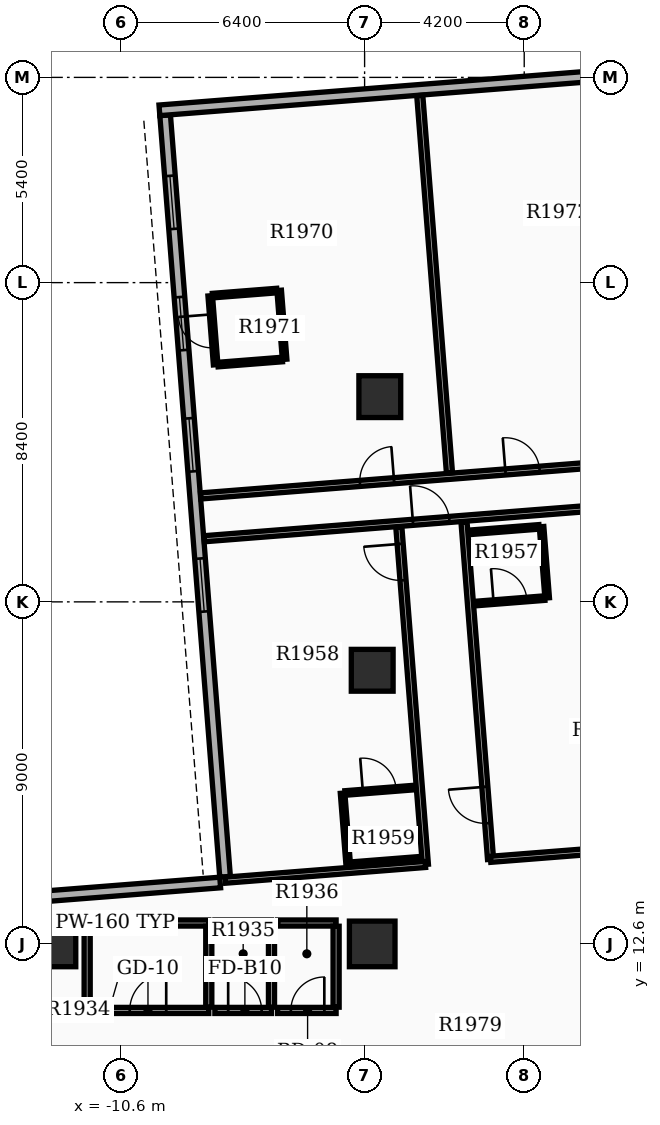
"""IFC4 building model, lengths in metres.
Left out: names, types, materials, properties, quantities, classifications, styles, units other than length and angle.
Written with IfcOpenShell. Run it as: python <this file> out.ifc"""

import sys

from ifc_helpers import new_model, si_unit, direction, frame, frame_2d, origin, origin_2d, place, context, subcontext, project, spatial, rectangle, extrude, element, fill, save


model = new_model("IFC4")
c1 = context("Model", 3, precision=1e-05, world=origin(), true_north=direction((0.0, 1.0)))
c2 = subcontext(c1, "Body", "Model", "MODEL_VIEW")
j1 = project(units=[si_unit("LENGTHUNIT", "METRE"), si_unit("PLANEANGLEUNIT", "RADIAN")], contexts=[c1])
p1 = place(None, origin())
s1 = spatial("IfcSite", under=j1, at=p1, CompositionType="ELEMENT")
p2 = place(p1, origin())
s2 = spatial("IfcBuilding", under=s1, at=p2, CompositionType="ELEMENT")
p3 = place(p2, frame((0.0, 0.0, 124.2)))
s3 = spatial("IfcBuildingStorey", under=s2, at=p3, CompositionType="ELEMENT", Elevation=124.2)
for number, where, z_axis, x_axis in (
    (1, (-12.4, 12.6, 0.0), (0.0, 0.0, 1.0), (1.0, 0.0, 0.0)),
    (2, (-4.0, 12.6, 0.0), (0.0, 0.0, 1.0), (1.0, 0.0, 0.0)),
):
    element("IfcColumn", number, at=place(p3, frame(where, z_axis=z_axis, x_axis=x_axis)), inside=s3, PredefinedType="COLUMN", context=c2, shape_type="SweptSolid", body=[
        extrude(rectangle(XDim=1.2, YDim=1.2, at=origin_2d()), origin(), (0.0, 0.0, 1.0), 3.9),
    ])
for number, where, z_axis, x_axis in (
    (3, (-4.0, 19.8, 0.0), (0.0, 0.0, 1.0), (1.0, 0.0, 0.0)),
    (4, (-3.8, 27.0, 0.0), (0.0, 0.0, 1.0), (1.0, 0.0, 0.0)),
):
    element("IfcColumn", number, at=place(p3, frame(where, z_axis=z_axis, x_axis=x_axis)), inside=s3, PredefinedType="COLUMN", context=c2, shape_type="SweptSolid", body=[
        extrude(rectangle(XDim=1.1, YDim=1.1, at=origin_2d()), origin(), (0.0, 0.0, 1.0), 3.9),
    ])
p4 = place(p3, frame((-9.448, 34.405, 0.0), z_axis=(0.0, 0.0, 1.0), x_axis=(0.078452802979, -0.996917828963, 0.0)))
e5 = element("IfcWall", 5, at=p4, inside=s3, PredefinedType="STANDARD", context=c2, shape_type="SweptSolid", body=[
    extrude(rectangle(XDim=20.1, YDim=0.28, at=frame_2d((10.05, 0.0))), origin(), (0.0, 0.0, 1.0), 2.97),
])
p5 = place(p4, frame((1.6, 0.0, 0.8)))
e6 = element("IfcOpeningElement", 6, at=p5, cuts=e5, PredefinedType="OPENING", context=c2, shape_type="SweptSolid", body=[
    extrude(rectangle(XDim=1.4, YDim=1.6, at=frame_2d((0.7, 0.8))), frame((0.0, 0.15, 0.0), z_axis=(0.0, -1.0, 0.0), x_axis=(1.0, 0.0, 0.0)), (0.0, 0.0, 1.0), 0.3),
])
p6 = place(p4, frame((4.8, 0.0, 0.8)))
e7 = element("IfcOpeningElement", 7, at=p6, cuts=e5, PredefinedType="OPENING", context=c2, shape_type="SweptSolid", body=[
    extrude(rectangle(XDim=1.4, YDim=1.6, at=frame_2d((0.7, 0.8))), frame((0.0, 0.15, 0.0), z_axis=(0.0, -1.0, 0.0), x_axis=(1.0, 0.0, 0.0)), (0.0, 0.0, 1.0), 0.3),
])
p7 = place(p4, frame((8.0, 0.0, 0.8)))
e8 = element("IfcOpeningElement", 8, at=p7, cuts=e5, PredefinedType="OPENING", context=c2, shape_type="SweptSolid", body=[
    extrude(rectangle(XDim=1.4, YDim=1.6, at=frame_2d((0.7, 0.8))), frame((0.0, 0.15, 0.0), z_axis=(0.0, -1.0, 0.0), x_axis=(1.0, 0.0, 0.0)), (0.0, 0.0, 1.0), 0.3),
])
p8 = place(p4, frame((11.7, 0.0, 0.8)))
e9 = element("IfcOpeningElement", 9, at=p8, cuts=e5, PredefinedType="OPENING", context=c2, shape_type="SweptSolid", body=[
    extrude(rectangle(XDim=1.4, YDim=1.6, at=frame_2d((0.7, 0.8))), frame((0.0, 0.15, 0.0), z_axis=(0.0, -1.0, 0.0), x_axis=(1.0, 0.0, 0.0)), (0.0, 0.0, 1.0), 0.3),
])
p9 = place(p3, frame((4.079, 35.61, 0.0), z_axis=(0.0, 0.0, 1.0), x_axis=(-0.996916198482, -0.078473519122, 0.0)))
e10 = element("IfcWall", 10, at=p9, inside=s3, PredefinedType="STANDARD", context=c2, shape_type="SweptSolid", body=[
    extrude(rectangle(XDim=13.72, YDim=0.28, at=frame_2d((6.86, 0.0))), origin(), (0.0, 0.0, 1.0), 2.97),
])
p10 = place(p9, frame((0.85, 0.0, 0.85)))
e11 = element("IfcOpeningElement", 11, at=p10, cuts=e10, PredefinedType="OPENING", context=c2, shape_type="SweptSolid", body=[
    extrude(rectangle(XDim=1.0, YDim=1.5, at=frame_2d((0.5, 0.75))), frame((0.0, 0.15, 0.0), z_axis=(0.0, -1.0, 0.0), x_axis=(1.0, 0.0, 0.0)), (0.0, 0.0, 1.0), 0.3),
])
p11 = place(p3, frame((-14.281, 13.722, 0.0), z_axis=(0.0, 0.0, 1.0), x_axis=(0.99691915642, 0.078435932851, 0.0)))
e12 = element("IfcWall", 12, at=p11, inside=s3, PredefinedType="STANDARD", context=c2, shape_type="SweptSolid", body=[
    extrude(rectangle(XDim=6.3, YDim=0.28, at=frame_2d((3.15, 0.0))), origin(), (0.0, 0.0, 1.0), 2.97),
])
p12 = place(p3, frame((-11.5, 10.85, 0.0), z_axis=(0.0, 0.0, 1.0), x_axis=(1.0, 0.0, 0.0)))
e13 = element("IfcWall", 13, at=p12, inside=s3, PredefinedType="PARTITIONING", context=c2, shape_type="SweptSolid", body=[
    extrude(rectangle(XDim=3.2, YDim=0.16, at=frame_2d((1.6, 0.0))), origin(), (0.0, 0.0, 1.0), 2.96),
])
p13 = place(p12, frame((1.12, 0.0, 0.0)))
e14 = element("IfcOpeningElement", 14, at=p13, cuts=e13, PredefinedType="OPENING", context=c2, shape_type="SweptSolid", body=[
    extrude(rectangle(XDim=0.96, YDim=2.15, at=frame_2d((0.48, 1.075))), frame((0.0, 0.09, 0.0), z_axis=(0.0, -1.0, 0.0), x_axis=(1.0, 0.0, 0.0)), (0.0, 0.0, 1.0), 0.18),
])
p14 = place(p3, frame((-11.5, 13.15, 0.0), z_axis=(0.0, 0.0, 1.0), x_axis=(1.0, 0.0, 0.0)))
e15 = element("IfcWall", 15, at=p14, inside=s3, PredefinedType="PARTITIONING", context=c2, shape_type="SweptSolid", body=[
    extrude(rectangle(XDim=3.2, YDim=0.16, at=frame_2d((1.6, 0.0))), origin(), (0.0, 0.0, 1.0), 2.96),
])
for number, where, z_axis, x_axis in (
    (16, (-11.5, 10.935, 0.0), (0.0, 0.0, 1.0), (0.0, 1.0, 0.0)),
    (17, (-8.3, 10.935, 0.0), (0.0, 0.0, 1.0), (0.0, 1.0, 0.0)),
):
    element("IfcWall", number, at=place(p3, frame(where, z_axis=z_axis, x_axis=x_axis)), inside=s3, PredefinedType="PARTITIONING", context=c2, shape_type="SweptSolid", body=[
        extrude(rectangle(XDim=2.13, YDim=0.16, at=frame_2d((1.065, 0.0))), origin(), (0.0, 0.0, 1.0), 2.96),
    ])
p15 = place(p3, frame((-8.14, 10.85, 0.0), z_axis=(0.0, 0.0, 1.0), x_axis=(1.0, 0.0, 0.0)))
e18 = element("IfcWall", 18, at=p15, inside=s3, PredefinedType="PARTITIONING", context=c2, shape_type="SweptSolid", body=[
    extrude(rectangle(XDim=1.49, YDim=0.16, at=frame_2d((0.745, 0.0))), origin(), (0.0, 0.0, 1.0), 2.96),
])
p16 = place(p15, frame((0.35, 0.0, 0.0)))
e19 = element("IfcOpeningElement", 19, at=p16, cuts=e18, PredefinedType="OPENING", context=c2, shape_type="SweptSolid", body=[
    extrude(rectangle(XDim=0.88, YDim=2.1, at=frame_2d((0.44, 1.05))), frame((0.0, 0.09, 0.0), z_axis=(0.0, -1.0, 0.0), x_axis=(1.0, 0.0, 0.0)), (0.0, 0.0, 1.0), 0.18),
])
p17 = place(p3, frame((-8.14, 13.15, 0.0), z_axis=(0.0, 0.0, 1.0), x_axis=(1.0, 0.0, 0.0)))
e20 = element("IfcWall", 20, at=p17, inside=s3, PredefinedType="PARTITIONING", context=c2, shape_type="SweptSolid", body=[
    extrude(rectangle(XDim=1.49, YDim=0.16, at=frame_2d((0.745, 0.0))), origin(), (0.0, 0.0, 1.0), 2.96),
])
p18 = place(p3, frame((-6.65, 10.935, 0.0), z_axis=(0.0, 0.0, 1.0), x_axis=(0.0, 1.0, 0.0)))
e21 = element("IfcWall", 21, at=p18, inside=s3, PredefinedType="PARTITIONING", context=c2, shape_type="SweptSolid", body=[
    extrude(rectangle(XDim=2.13, YDim=0.16, at=frame_2d((1.065, 0.0))), origin(), (0.0, 0.0, 1.0), 2.96),
])
p19 = place(p3, frame((-6.49, 10.85, 0.0), z_axis=(0.0, 0.0, 1.0), x_axis=(1.0, 0.0, 0.0)))
e22 = element("IfcWall", 22, at=p19, inside=s3, PredefinedType="PARTITIONING", context=c2, shape_type="SweptSolid", body=[
    extrude(rectangle(XDim=1.54, YDim=0.16, at=frame_2d((0.77, 0.0))), origin(), (0.0, 0.0, 1.0), 2.96),
])
p20 = place(p19, frame((0.35, 0.0, 0.0)))
e23 = element("IfcOpeningElement", 23, at=p20, cuts=e22, PredefinedType="OPENING", context=c2, shape_type="SweptSolid", body=[
    extrude(rectangle(XDim=0.88, YDim=2.15, at=frame_2d((0.44, 1.075))), frame((0.0, 0.09, 0.0), z_axis=(0.0, -1.0, 0.0), x_axis=(1.0, 0.0, 0.0)), (0.0, 0.0, 1.0), 0.18),
])
p21 = place(p3, frame((-6.49, 13.15, 0.0), z_axis=(0.0, 0.0, 1.0), x_axis=(1.0, 0.0, 0.0)))
e24 = element("IfcWall", 24, at=p21, inside=s3, PredefinedType="PARTITIONING", context=c2, shape_type="SweptSolid", body=[
    extrude(rectangle(XDim=1.54, YDim=0.16, at=frame_2d((0.77, 0.0))), origin(), (0.0, 0.0, 1.0), 2.96),
])
p22 = place(p3, frame((-4.95, 10.935, 0.0), z_axis=(0.0, 0.0, 1.0), x_axis=(0.0, 1.0, 0.0)))
e25 = element("IfcWall", 25, at=p22, inside=s3, PredefinedType="PARTITIONING", context=c2, shape_type="SweptSolid", body=[
    extrude(rectangle(XDim=2.13, YDim=0.16, at=frame_2d((1.065, 0.0))), origin(), (0.0, 0.0, 1.0), 2.96),
])
p23 = place(p3, frame((-0.886, 14.826, 0.0), z_axis=(0.0, 0.0, 1.0), x_axis=(-0.078454258523, 0.996917714418, 0.0)))
e26 = element("IfcWall", 26, at=p23, inside=s3, PredefinedType="PARTITIONING", context=c2, shape_type="SweptSolid", body=[
    extrude(rectangle(XDim=8.9, YDim=0.16, at=frame_2d((4.45, 0.0))), origin(), (0.0, 0.0, 1.0), 2.96),
])
p24 = place(p23, frame((0.953, 0.0, 0.0)))
e27 = element("IfcOpeningElement", 27, at=p24, cuts=e26, PredefinedType="OPENING", context=c2, shape_type="SweptSolid", body=[
    extrude(rectangle(XDim=0.96, YDim=2.15, at=frame_2d((0.48, 1.075))), frame((0.0, 0.09, 0.0), z_axis=(0.0, -1.0, 0.0), x_axis=(1.0, 0.0, 0.0)), (0.0, 0.0, 1.0), 0.18),
])
p25 = place(p3, frame((-0.886, 14.826, 0.0), z_axis=(0.0, 0.0, 1.0), x_axis=(0.996916203247, 0.078473458597, 0.0)))
e28 = element("IfcWall", 28, at=p25, inside=s3, PredefinedType="PARTITIONING", context=c2, shape_type="SweptSolid", body=[
    extrude(rectangle(XDim=6.44, YDim=0.16, at=frame_2d((3.22, 0.0))), origin(), (0.0, 0.0, 1.0), 2.96),
])
p26 = place(p3, frame((-1.275, 21.556, 0.0), z_axis=(0.0, 0.0, 1.0), x_axis=(0.996916400774, 0.0784709492, 0.0)))
e29 = element("IfcWall", 29, at=p26, inside=s3, PredefinedType="PARTITIONING", context=c2, shape_type="SweptSolid", body=[
    extrude(rectangle(XDim=1.82, YDim=0.12, at=frame_2d((0.91, 0.0))), origin(), (0.0, 0.0, 1.0), 2.96),
])
p27 = place(p26, frame((0.47, 0.0, 0.0)))
e30 = element("IfcOpeningElement", 30, at=p27, cuts=e29, PredefinedType="OPENING", context=c2, shape_type="SweptSolid", body=[
    extrude(rectangle(XDim=0.88, YDim=2.1, at=frame_2d((0.44, 1.05))), frame((0.0, 0.07, 0.0), z_axis=(0.0, -1.0, 0.0), x_axis=(1.0, 0.0, 0.0)), (0.0, 0.0, 1.0), 0.14),
])
p28 = place(p3, frame((-1.423, 23.431, 0.0), z_axis=(0.0, 0.0, 1.0), x_axis=(0.996915574626, 0.078481444107, 0.0)))
e31 = element("IfcWall", 31, at=p28, inside=s3, PredefinedType="PARTITIONING", context=c2, shape_type="SweptSolid", body=[
    extrude(rectangle(XDim=1.82, YDim=0.12, at=frame_2d((0.91, 0.0))), origin(), (0.0, 0.0, 1.0), 2.96),
])
p29 = place(p3, frame((0.604, 21.704, 0.0), z_axis=(0.0, 0.0, 1.0), x_axis=(-0.07843418698, 0.996919293781, 0.0)))
e32 = element("IfcWall", 32, at=p29, inside=s3, PredefinedType="PARTITIONING", context=c2, shape_type="SweptSolid", body=[
    extrude(rectangle(XDim=1.88, YDim=0.12, at=frame_2d((0.94, 0.0))), origin(), (0.0, 0.0, 1.0), 2.96),
])
p30 = place(p3, frame((-2.601, 14.691, 0.0), z_axis=(0.0, 0.0, 1.0), x_axis=(-0.07848152115, 0.99691556856, 0.0)))
e33 = element("IfcWall", 33, at=p30, inside=s3, PredefinedType="PARTITIONING", context=c2, shape_type="SweptSolid", body=[
    extrude(rectangle(XDim=8.9, YDim=0.16, at=frame_2d((4.45, 0.0))), origin(), (0.0, 0.0, 1.0), 2.96),
])
p31 = place(p30, frame((7.5, 0.0, 0.0)))
e34 = element("IfcOpeningElement", 34, at=p31, cuts=e33, PredefinedType="OPENING", context=c2, shape_type="SweptSolid", body=[
    extrude(rectangle(XDim=0.96, YDim=2.15, at=frame_2d((0.48, 1.075))), frame((0.0, 0.09, 0.0), z_axis=(0.0, -1.0, 0.0), x_axis=(1.0, 0.0, 0.0)), (0.0, 0.0, 1.0), 0.18),
])
p32 = place(p3, frame((-2.601, 14.691, 0.0), z_axis=(0.0, 0.0, 1.0), x_axis=(-0.996920542587, -0.078418312705, 0.0)))
e35 = element("IfcWall", 35, at=p32, inside=s3, PredefinedType="PARTITIONING", context=c2, shape_type="SweptSolid", body=[
    extrude(rectangle(XDim=5.28, YDim=0.16, at=frame_2d((2.64, 0.0))), origin(), (0.0, 0.0, 1.0), 2.96),
])
p33 = place(p3, frame((-4.715, 16.571, 0.0), z_axis=(0.0, 0.0, 1.0), x_axis=(0.996915574626, 0.078481444107, 0.0)))
e36 = element("IfcWall", 36, at=p33, inside=s3, PredefinedType="PARTITIONING", context=c2, shape_type="SweptSolid", body=[
    extrude(rectangle(XDim=1.82, YDim=0.12, at=frame_2d((0.91, 0.0))), origin(), (0.0, 0.0, 1.0), 2.96),
])
p34 = place(p33, frame((0.47, 0.0, 0.0)))
e37 = element("IfcOpeningElement", 37, at=p34, cuts=e36, PredefinedType="OPENING", context=c2, shape_type="SweptSolid", body=[
    extrude(rectangle(XDim=0.88, YDim=2.1, at=frame_2d((0.44, 1.05))), frame((0.0, 0.07, 0.0), z_axis=(0.0, -1.0, 0.0), x_axis=(1.0, 0.0, 0.0)), (0.0, 0.0, 1.0), 0.14),
])
p35 = place(p3, frame((-4.567, 14.697, 0.0), z_axis=(0.0, 0.0, 1.0), x_axis=(0.996916400774, 0.0784709492, 0.0)))
e38 = element("IfcWall", 38, at=p35, inside=s3, PredefinedType="PARTITIONING", context=c2, shape_type="SweptSolid", body=[
    extrude(rectangle(XDim=1.82, YDim=0.12, at=frame_2d((0.91, 0.0))), origin(), (0.0, 0.0, 1.0), 2.96),
])
p36 = place(p3, frame((-4.632, 14.692, 0.0), z_axis=(0.0, 0.0, 1.0), x_axis=(-0.07843418698, 0.996919293781, 0.0)))
e39 = element("IfcWall", 39, at=p36, inside=s3, PredefinedType="PARTITIONING", context=c2, shape_type="SweptSolid", body=[
    extrude(rectangle(XDim=1.88, YDim=0.12, at=frame_2d((0.94, 0.0))), origin(), (0.0, 0.0, 1.0), 2.96),
])
p37 = place(p3, frame((-8.423, 23.261, 0.0), z_axis=(0.0, 0.0, 1.0), x_axis=(0.996917447065, 0.078457655694, 0.0)))
e40 = element("IfcWall", 40, at=p37, inside=s3, PredefinedType="PARTITIONING", context=c2, shape_type="SweptSolid", body=[
    extrude(rectangle(XDim=13.144, YDim=0.16, at=frame_2d((6.572, 0.0))), origin(), (0.0, 0.0, 1.0), 2.96),
])
p38 = place(p37, frame((5.512, 0.0, 0.0)))
e41 = element("IfcOpeningElement", 41, at=p38, cuts=e40, PredefinedType="OPENING", context=c2, shape_type="SweptSolid", body=[
    extrude(rectangle(XDim=0.96, YDim=2.15, at=frame_2d((0.48, 1.075))), frame((0.0, 0.09, 0.0), z_axis=(0.0, -1.0, 0.0), x_axis=(1.0, 0.0, 0.0)), (0.0, 0.0, 1.0), 0.18),
])
p39 = place(p3, frame((-8.512, 24.387, 0.0), z_axis=(0.0, 0.0, 1.0), x_axis=(0.996915994096, 0.078476115573, 0.0)))
e42 = element("IfcWall", 42, at=p39, inside=s3, PredefinedType="PARTITIONING", context=c2, shape_type="SweptSolid", body=[
    extrude(rectangle(XDim=13.144, YDim=0.16, at=frame_2d((6.572, 0.0))), origin(), (0.0, 0.0, 1.0), 2.96),
])
p40 = place(p39, frame((4.202, 0.0, 0.0)))
e43 = element("IfcOpeningElement", 43, at=p40, cuts=e42, PredefinedType="OPENING", context=c2, shape_type="SweptSolid", body=[
    extrude(rectangle(XDim=0.9, YDim=2.15, at=frame_2d((0.45, 1.075))), frame((0.0, 0.09, 0.0), z_axis=(0.0, -1.0, 0.0), x_axis=(1.0, 0.0, 0.0)), (0.0, 0.0, 1.0), 0.18),
])
p41 = place(p39, frame((8.042, 0.0, 0.0)))
e44 = element("IfcOpeningElement", 44, at=p41, cuts=e42, PredefinedType="OPENING", context=c2, shape_type="SweptSolid", body=[
    extrude(rectangle(XDim=0.9, YDim=2.15, at=frame_2d((0.45, 1.075))), frame((0.0, 0.09, 0.0), z_axis=(0.0, -1.0, 0.0), x_axis=(1.0, 0.0, 0.0)), (0.0, 0.0, 1.0), 0.18),
])
p42 = place(p3, frame((-1.967, 24.993, 0.0), z_axis=(0.0, 0.0, 1.0), x_axis=(-0.078446753713, 0.996918304994, 0.0)))
e45 = element("IfcWall", 45, at=p42, inside=s3, PredefinedType="PARTITIONING", context=c2, shape_type="SweptSolid", body=[
    extrude(rectangle(XDim=9.962, YDim=0.16, at=frame_2d((4.981, 0.0))), origin(), (0.0, 0.0, 1.0), 2.96),
])
p43 = place(p3, frame((-8.119, 27.839, 0.0), z_axis=(0.0, 0.0, 1.0), x_axis=(-0.0784709492, 0.996916400774, 0.0)))
e46 = element("IfcWall", 46, at=p43, inside=s3, PredefinedType="PARTITIONING", context=c2, shape_type="SweptSolid", body=[
    extrude(rectangle(XDim=1.82, YDim=0.12, at=frame_2d((0.91, 0.0))), origin(), (0.0, 0.0, 1.0), 2.96),
])
p44 = place(p43, frame((0.45, 0.0, 0.0)))
e47 = element("IfcOpeningElement", 47, at=p44, cuts=e46, PredefinedType="OPENING", context=c2, shape_type="SweptSolid", body=[
    extrude(rectangle(XDim=0.88, YDim=2.1, at=frame_2d((0.44, 1.05))), frame((0.0, 0.07, 0.0), z_axis=(0.0, -1.0, 0.0), x_axis=(1.0, 0.0, 0.0)), (0.0, 0.0, 1.0), 0.14),
])
p45 = place(p3, frame((-6.305, 27.982, 0.0), z_axis=(0.0, 0.0, 1.0), x_axis=(-0.078481444107, 0.996915574626, 0.0)))
e48 = element("IfcWall", 48, at=p45, inside=s3, PredefinedType="PARTITIONING", context=c2, shape_type="SweptSolid", body=[
    extrude(rectangle(XDim=1.82, YDim=0.12, at=frame_2d((0.91, 0.0))), origin(), (0.0, 0.0, 1.0), 2.96),
])
for number, where, z_axis, x_axis in (
    (49, (-8.059, 27.844, 0.0), (0.0, 0.0, 1.0), (0.997, 0.078, 0.0)),
    (50, (-8.202, 29.658, 0.0), (0.0, 0.0, 1.0), (0.997, 0.078, 0.0)),
):
    element("IfcWall", number, at=place(p3, frame(where, z_axis=z_axis, x_axis=x_axis)), inside=s3, PredefinedType="PARTITIONING", context=c2, shape_type="SweptSolid", body=[
        extrude(rectangle(XDim=1.7, YDim=0.12, at=frame_2d((0.85, 0.0))), origin(), (0.0, 0.0, 1.0), 2.96),
    ])
p46 = place(p5, origin())
e51 = element("IfcWindow", 51, at=p46, inside=s3, PartitioningType="SINGLE_PANEL", PredefinedType="WINDOW", context=c2, shape_type="SweptSolid", body=[
    extrude(rectangle(XDim=1.4, YDim=1.6, at=frame_2d((0.7, 0.8))), frame((0.0, 0.03, 0.0), z_axis=(0.0, -1.0, 0.0), x_axis=(1.0, 0.0, 0.0)), (0.0, 0.0, 1.0), 0.06),
])
fill(e6, e51)
p47 = place(p6, origin())
e52 = element("IfcWindow", 52, at=p47, inside=s3, PartitioningType="SINGLE_PANEL", PredefinedType="WINDOW", context=c2, shape_type="SweptSolid", body=[
    extrude(rectangle(XDim=1.4, YDim=1.6, at=frame_2d((0.7, 0.8))), frame((0.0, 0.03, 0.0), z_axis=(0.0, -1.0, 0.0), x_axis=(1.0, 0.0, 0.0)), (0.0, 0.0, 1.0), 0.06),
])
fill(e7, e52)
p48 = place(p7, origin())
e53 = element("IfcWindow", 53, at=p48, inside=s3, PartitioningType="SINGLE_PANEL", PredefinedType="WINDOW", context=c2, shape_type="SweptSolid", body=[
    extrude(rectangle(XDim=1.4, YDim=1.6, at=frame_2d((0.7, 0.8))), frame((0.0, 0.03, 0.0), z_axis=(0.0, -1.0, 0.0), x_axis=(1.0, 0.0, 0.0)), (0.0, 0.0, 1.0), 0.06),
])
fill(e8, e53)
p49 = place(p8, origin())
e54 = element("IfcWindow", 54, at=p49, inside=s3, PartitioningType="SINGLE_PANEL", PredefinedType="WINDOW", context=c2, shape_type="SweptSolid", body=[
    extrude(rectangle(XDim=1.4, YDim=1.6, at=frame_2d((0.7, 0.8))), frame((0.0, 0.03, 0.0), z_axis=(0.0, -1.0, 0.0), x_axis=(1.0, 0.0, 0.0)), (0.0, 0.0, 1.0), 0.06),
])
fill(e9, e54)
p50 = place(p13, origin())
e55 = element("IfcDoor", 55, at=p50, inside=s3, OperationType="SINGLE_SWING_RIGHT", PredefinedType="DOOR", context=c2, shape_type="SweptSolid", body=[
    extrude(rectangle(XDim=0.96, YDim=2.15, at=frame_2d((0.48, 1.075))), frame((0.0, 0.025, 0.0), z_axis=(0.0, -1.0, 0.0), x_axis=(1.0, 0.0, 0.0)), (0.0, 0.0, 1.0), 0.05),
])
fill(e14, e55)
p51 = place(p16, origin())
e56 = element("IfcDoor", 56, at=p51, inside=s3, OperationType="SINGLE_SWING_LEFT", PredefinedType="DOOR", context=c2, shape_type="SweptSolid", body=[
    extrude(rectangle(XDim=0.88, YDim=2.1, at=frame_2d((0.44, 1.05))), frame((0.0, 0.025, 0.0), z_axis=(0.0, -1.0, 0.0), x_axis=(1.0, 0.0, 0.0)), (0.0, 0.0, 1.0), 0.05),
])
fill(e19, e56)
p52 = place(p20, origin())
e57 = element("IfcDoor", 57, at=p52, inside=s3, OperationType="SINGLE_SWING_RIGHT", PredefinedType="DOOR", context=c2, shape_type="SweptSolid", body=[
    extrude(rectangle(XDim=0.88, YDim=2.15, at=frame_2d((0.44, 1.075))), frame((0.0, 0.025, 0.0), z_axis=(0.0, -1.0, 0.0), x_axis=(1.0, 0.0, 0.0)), (0.0, 0.0, 1.0), 0.05),
])
fill(e23, e57)
p53 = place(p24, origin())
e58 = element("IfcDoor", 58, at=p53, inside=s3, OperationType="SINGLE_SWING_RIGHT", PredefinedType="DOOR", context=c2, shape_type="SweptSolid", body=[
    extrude(rectangle(XDim=0.96, YDim=2.15, at=frame_2d((0.48, 1.075))), frame((0.0, 0.025, 0.0), z_axis=(0.0, -1.0, 0.0), x_axis=(1.0, 0.0, 0.0)), (0.0, 0.0, 1.0), 0.05),
])
fill(e27, e58)
p54 = place(p27, origin())
e59 = element("IfcDoor", 59, at=p54, inside=s3, OperationType="SINGLE_SWING_LEFT", PredefinedType="DOOR", context=c2, shape_type="SweptSolid", body=[
    extrude(rectangle(XDim=0.88, YDim=2.1, at=frame_2d((0.44, 1.05))), frame((0.0, 0.025, 0.0), z_axis=(0.0, -1.0, 0.0), x_axis=(1.0, 0.0, 0.0)), (0.0, 0.0, 1.0), 0.05),
])
fill(e30, e59)
p55 = place(p31, origin())
e60 = element("IfcDoor", 60, at=p55, inside=s3, OperationType="SINGLE_SWING_RIGHT", PredefinedType="DOOR", context=c2, shape_type="SweptSolid", body=[
    extrude(rectangle(XDim=0.96, YDim=2.15, at=frame_2d((0.48, 1.075))), frame((0.0, 0.025, 0.0), z_axis=(0.0, -1.0, 0.0), x_axis=(1.0, 0.0, 0.0)), (0.0, 0.0, 1.0), 0.05),
])
fill(e34, e60)
p56 = place(p34, origin())
e61 = element("IfcDoor", 61, at=p56, inside=s3, OperationType="SINGLE_SWING_LEFT", PredefinedType="DOOR", context=c2, shape_type="SweptSolid", body=[
    extrude(rectangle(XDim=0.88, YDim=2.1, at=frame_2d((0.44, 1.05))), frame((0.0, 0.025, 0.0), z_axis=(0.0, -1.0, 0.0), x_axis=(1.0, 0.0, 0.0)), (0.0, 0.0, 1.0), 0.05),
])
fill(e37, e61)
p57 = place(p38, origin())
e62 = element("IfcDoor", 62, at=p57, inside=s3, OperationType="SINGLE_SWING_LEFT", PredefinedType="DOOR", context=c2, shape_type="SweptSolid", body=[
    extrude(rectangle(XDim=0.96, YDim=2.15, at=frame_2d((0.48, 1.075))), frame((0.0, 0.025, 0.0), z_axis=(0.0, -1.0, 0.0), x_axis=(1.0, 0.0, 0.0)), (0.0, 0.0, 1.0), 0.05),
])
fill(e41, e62)
p58 = place(p40, origin())
e63 = element("IfcDoor", 63, at=p58, inside=s3, OperationType="SINGLE_SWING_RIGHT", PredefinedType="DOOR", context=c2, shape_type="SweptSolid", body=[
    extrude(rectangle(XDim=0.9, YDim=2.15, at=frame_2d((0.45, 1.075))), frame((0.0, 0.025, 0.0), z_axis=(0.0, -1.0, 0.0), x_axis=(1.0, 0.0, 0.0)), (0.0, 0.0, 1.0), 0.05),
])
fill(e43, e63)
p59 = place(p44, origin())
e64 = element("IfcDoor", 64, at=p59, inside=s3, OperationType="SINGLE_SWING_RIGHT", PredefinedType="DOOR", context=c2, shape_type="SweptSolid", body=[
    extrude(rectangle(XDim=0.88, YDim=2.1, at=frame_2d((0.44, 1.05))), frame((0.0, 0.025, 0.0), z_axis=(0.0, -1.0, 0.0), x_axis=(1.0, 0.0, 0.0)), (0.0, 0.0, 1.0), 0.05),
])
fill(e47, e64)
p60 = place(p41, origin())
e65 = element("IfcDoor", 65, at=p60, inside=s3, OperationType="SINGLE_SWING_LEFT", PredefinedType="DOOR", context=c2, shape_type="SweptSolid", body=[
    extrude(rectangle(XDim=0.9, YDim=2.15, at=frame_2d((0.45, 1.075))), frame((0.0, 0.025, 0.0), z_axis=(0.0, -1.0, 0.0), x_axis=(1.0, 0.0, 0.0)), (0.0, 0.0, 1.0), 0.05),
])
fill(e44, e65)
save(model, sys.argv[1])
